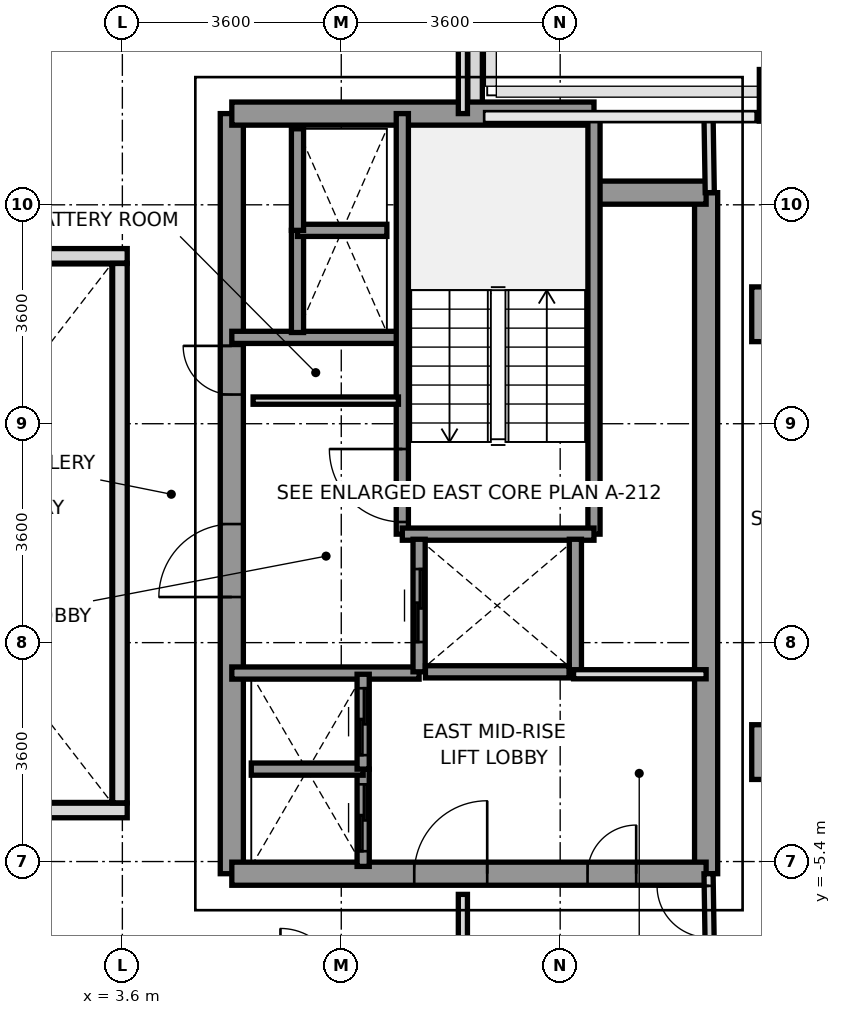
"""IFC4 building model, lengths in metres.
Left out: names, types, materials, properties, quantities, classifications, styles, units other than length and angle.
Written with IfcOpenShell. Run it as: python <this file> out.ifc"""

import sys

from ifc_helpers import new_model, si_unit, direction, frame, frame_2d, origin, origin_2d, place, context, subcontext, project, spatial, rectangle, extrude, source, transform, mapped, element, fill, save


model = new_model("IFC4")
c1 = context("Model", 3, precision=1e-05, world=origin(), true_north=direction((0.0, 1.0)))
c2 = subcontext(c1, "Body", "Model", "MODEL_VIEW")
j1 = project(units=[si_unit("LENGTHUNIT", "METRE"), si_unit("PLANEANGLEUNIT", "RADIAN")], contexts=[c1])
p1 = place(None, origin())
s1 = spatial("IfcSite", under=j1, at=p1, CompositionType="ELEMENT")
p2 = place(p1, origin())
s2 = spatial("IfcBuilding", under=s1, at=p2, CompositionType="ELEMENT")
p3 = place(p2, frame((0.0, 0.0, 174.0)))
s3 = spatial("IfcBuildingStorey", under=s2, at=p3, CompositionType="ELEMENT", Elevation=174.0)
m1 = source(origin(), c2, "Body", "SweptSolid", [
    extrude(rectangle(XDim=0.9, YDim=0.9, at=origin_2d()), origin(), (0.0, 0.0, 1.0), 3.2),
])
for number, where, z_axis, x_axis in (
    (1, (14.4, -3.6, 0.0), (0.0, 0.0, 1.0), (1.0, 0.0, 0.0)),
    (2, (14.4, 3.6, 0.0), (0.0, 0.0, 1.0), (1.0, 0.0, 0.0)),
):
    element("IfcColumn", number, at=place(p3, frame(where, z_axis=z_axis, x_axis=x_axis)), inside=s3, PredefinedType="COLUMN", context=c2, shape_type="MappedRepresentation", body=[
        mapped(m1, transform((0.0, 0.0, 0.0), x_axis=(1.0, 0.0, 0.0), y_axis=(0.0, 1.0, 0.0), z_axis=(0.0, 0.0, 1.0), scale=1.0)),
    ])
m2 = source(origin(), c2, "Body", "SweptSolid", [
    extrude(rectangle(XDim=0.65, YDim=0.85, at=origin_2d()), origin(), (0.0, 0.0, 1.0), 3.2),
])
p4 = place(p3, frame((14.4, 7.2, 0.0), z_axis=(0.0, 0.0, 1.0), x_axis=(1.0, 0.0, 0.0)))
e3 = element("IfcColumn", 3, at=p4, inside=s3, PredefinedType="COLUMN", context=c2, shape_type="MappedRepresentation", body=[
    mapped(m2, transform((0.0, 0.0, 0.0), x_axis=(1.0, 0.0, 0.0), y_axis=(0.0, 1.0, 0.0), z_axis=(0.0, 0.0, 1.0), scale=1.0)),
])
p5 = place(p3, frame((9.4, 8.547, 0.0), z_axis=(0.0, 0.0, 1.0), x_axis=(0.0, -1.0, 0.0)))
e4 = element("IfcWall", 4, at=p5, inside=s3, PredefinedType="PARAPET", context=c2, shape_type="SweptSolid", body=[
    extrude(rectangle(XDim=1.594, YDim=0.24, at=frame_2d((0.797, 0.0))), origin(), (0.0, 0.0, 1.0), 1.15),
])
p6 = place(p3, frame((13.2, -5.6, 0.0), z_axis=(0.0, 0.0, 1.0), x_axis=(0.0, 1.0, 0.0)))
e5 = element("IfcWall", 5, at=p6, inside=s3, PredefinedType="SHEAR", context=c2, shape_type="SweptSolid", body=[
    extrude(rectangle(XDim=11.2, YDim=0.38, at=frame_2d((5.6, 0.0))), origin(), (0.0, 0.0, 1.0), 3.2),
])
p7 = place(p3, frame((5.4, -5.6, 0.0), z_axis=(0.0, 0.0, 1.0), x_axis=(0.0, 1.0, 0.0)))
e6 = element("IfcWall", 6, at=p7, inside=s3, PredefinedType="SHEAR", context=c2, shape_type="SweptSolid", body=[
    extrude(rectangle(XDim=12.5, YDim=0.38, at=frame_2d((6.25, 0.0))), origin(), (0.0, 0.0, 1.0), 3.2),
])
p8 = place(p7, frame((4.55, 0.0, 0.0)))
e7 = element("IfcOpeningElement", 7, at=p8, cuts=e6, PredefinedType="OPENING", context=c2, shape_type="SweptSolid", body=[
    extrude(rectangle(XDim=1.2, YDim=2.2, at=frame_2d((0.6, 1.1))), frame((0.0, 0.2, 0.0), z_axis=(0.0, -1.0, 0.0), x_axis=(1.0, 0.0, 0.0)), (0.0, 0.0, 1.0), 0.4),
])
p9 = place(p7, frame((7.88, 0.0, 0.0)))
e8 = element("IfcOpeningElement", 8, at=p9, cuts=e6, PredefinedType="OPENING", context=c2, shape_type="SweptSolid", body=[
    extrude(rectangle(XDim=0.8, YDim=2.1, at=frame_2d((0.4, 1.05))), frame((0.0, 0.2, 0.0), z_axis=(0.0, -1.0, 0.0), x_axis=(1.0, 0.0, 0.0)), (0.0, 0.0, 1.0), 0.4),
])
p10 = place(p3, frame((5.4, 6.9, 0.0), z_axis=(0.0, 0.0, 1.0), x_axis=(1.0, 0.0, 0.0)))
e9 = element("IfcWall", 9, at=p10, inside=s3, PredefinedType="SHEAR", context=c2, shape_type="SweptSolid", body=[
    extrude(rectangle(XDim=5.956, YDim=0.38, at=frame_2d((2.978, 0.0))), origin(), (0.0, 0.0, 1.0), 3.2),
])
p11 = place(p3, frame((11.356, 5.6, 0.0), z_axis=(0.0, 0.0, 1.0), x_axis=(1.0, 0.0, 0.0)))
e10 = element("IfcWall", 10, at=p11, inside=s3, PredefinedType="SHEAR", context=c2, shape_type="SweptSolid", body=[
    extrude(rectangle(XDim=1.844, YDim=0.38, at=frame_2d((0.922, 0.0))), origin(), (0.0, 0.0, 1.0), 3.2),
])
p12 = place(p3, frame((5.4, -5.6, 0.0), z_axis=(0.0, 0.0, 1.0), x_axis=(1.0, 0.0, 0.0)))
e11 = element("IfcWall", 11, at=p12, inside=s3, PredefinedType="SHEAR", context=c2, shape_type="SweptSolid", body=[
    extrude(rectangle(XDim=7.8, YDim=0.38, at=frame_2d((3.9, 0.0))), origin(), (0.0, 0.0, 1.0), 3.2),
])
p13 = place(p12, frame((3.0, 0.0, 0.0)))
e12 = element("IfcOpeningElement", 12, at=p13, cuts=e11, PredefinedType="OPENING", context=c2, shape_type="SweptSolid", body=[
    extrude(rectangle(XDim=1.2, YDim=2.2, at=frame_2d((0.6, 1.1))), frame((0.0, 0.2, 0.0), z_axis=(0.0, -1.0, 0.0), x_axis=(1.0, 0.0, 0.0)), (0.0, 0.0, 1.0), 0.4),
])
p14 = place(p12, frame((5.85, 0.0, 0.0)))
e13 = element("IfcOpeningElement", 13, at=p14, cuts=e11, PredefinedType="OPENING", context=c2, shape_type="SweptSolid", body=[
    extrude(rectangle(XDim=0.8, YDim=2.1, at=frame_2d((0.4, 1.05))), frame((0.0, 0.2, 0.0), z_axis=(0.0, -1.0, 0.0), x_axis=(1.0, 0.0, 0.0)), (0.0, 0.0, 1.0), 0.4),
])
p15 = place(p3, frame((5.4, 3.22, 0.0), z_axis=(0.0, 0.0, 1.0), x_axis=(1.0, 0.0, 0.0)))
e14 = element("IfcWall", 14, at=p15, inside=s3, PredefinedType="SOLIDWALL", context=c2, shape_type="SweptSolid", body=[
    extrude(rectangle(XDim=2.78, YDim=0.2, at=frame_2d((1.39, 0.0))), origin(), (0.0, 0.0, 1.0), 3.2),
])
p16 = place(p3, frame((5.4, -2.3, 0.0), z_axis=(0.0, 0.0, 1.0), x_axis=(1.0, 0.0, 0.0)))
e15 = element("IfcWall", 15, at=p16, inside=s3, PredefinedType="SOLIDWALL", context=c2, shape_type="SweptSolid", body=[
    extrude(rectangle(XDim=3.08, YDim=0.2, at=frame_2d((1.54, 0.0))), origin(), (0.0, 0.0, 1.0), 3.2),
])
p17 = place(p3, frame((8.204, -0.016, 0.0), z_axis=(0.0, 0.0, 1.0), x_axis=(0.0, 1.0, 0.0)))
e16 = element("IfcWall", 16, at=p17, inside=s3, PredefinedType="SOLIDWALL", context=c2, shape_type="SweptSolid", body=[
    extrude(rectangle(XDim=6.916, YDim=0.2, at=frame_2d((3.458, 0.0))), origin(), (0.0, 0.0, 1.0), 3.2),
])
p18 = place(p17, frame((0.2, 0.0, 0.0)))
e17 = element("IfcOpeningElement", 17, at=p18, cuts=e16, PredefinedType="OPENING", context=c2, shape_type="SweptSolid", body=[
    extrude(rectangle(XDim=1.2, YDim=2.2, at=frame_2d((0.6, 1.1))), frame((0.0, 0.11, 0.0), z_axis=(0.0, -1.0, 0.0), x_axis=(1.0, 0.0, 0.0)), (0.0, 0.0, 1.0), 0.22),
])
p19 = place(p3, frame((11.356, -0.016, 0.0), z_axis=(0.0, 0.0, 1.0), x_axis=(0.0, 1.0, 0.0)))
e18 = element("IfcWall", 18, at=p19, inside=s3, PredefinedType="SOLIDWALL", context=c2, shape_type="SweptSolid", body=[
    extrude(rectangle(XDim=6.916, YDim=0.2, at=frame_2d((3.458, 0.0))), origin(), (0.0, 0.0, 1.0), 3.2),
])
p20 = place(p3, frame((8.204, -0.016, 0.0), z_axis=(0.0, 0.0, 1.0), x_axis=(1.0, 0.0, 0.0)))
e19 = element("IfcWall", 19, at=p20, inside=s3, PredefinedType="SOLIDWALL", context=c2, shape_type="SweptSolid", body=[
    extrude(rectangle(XDim=3.152, YDim=0.2, at=frame_2d((1.576, 0.0))), origin(), (0.0, 0.0, 1.0), 3.2),
])
p21 = place(p3, frame((8.48, -2.28, 0.0), z_axis=(0.0, 0.0, 1.0), x_axis=(0.0, 1.0, 0.0)))
e20 = element("IfcWall", 20, at=p21, inside=s3, PredefinedType="SOLIDWALL", context=c2, shape_type="SweptSolid", body=[
    extrude(rectangle(XDim=2.18, YDim=0.2, at=frame_2d((1.09, 0.0))), origin(), (0.0, 0.0, 1.0), 3.2),
])
p22 = place(p21, frame((0.49, 0.0, 0.0)))
e21 = element("IfcOpeningElement", 21, at=p22, cuts=e20, PredefinedType="OPENING", context=c2, shape_type="SweptSolid", body=[
    extrude(rectangle(XDim=1.2, YDim=2.2, at=frame_2d((0.6, 1.1))), frame((0.0, 0.11, 0.0), z_axis=(0.0, -1.0, 0.0), x_axis=(1.0, 0.0, 0.0)), (0.0, 0.0, 1.0), 0.22),
])
p23 = place(p3, frame((11.05, -2.28, 0.0), z_axis=(0.0, 0.0, 1.0), x_axis=(0.0, 1.0, 0.0)))
e22 = element("IfcWall", 22, at=p23, inside=s3, PredefinedType="SOLIDWALL", context=c2, shape_type="SweptSolid", body=[
    extrude(rectangle(XDim=2.18, YDim=0.2, at=frame_2d((1.09, 0.0))), origin(), (0.0, 0.0, 1.0), 3.2),
])
p24 = place(p3, frame((8.584, -2.28, 0.0), z_axis=(0.0, 0.0, 1.0), x_axis=(1.0, 0.0, 0.0)))
e23 = element("IfcWall", 23, at=p24, inside=s3, PredefinedType="SOLIDWALL", context=c2, shape_type="SweptSolid", body=[
    extrude(rectangle(XDim=2.362, YDim=0.2, at=frame_2d((1.181, 0.0))), origin(), (0.0, 0.0, 1.0), 3.2),
])
p25 = place(p3, frame((7.56, -5.48, 0.0), z_axis=(0.0, 0.0, 1.0), x_axis=(0.0, 1.0, 0.0)))
e24 = element("IfcWall", 24, at=p25, inside=s3, PredefinedType="SOLIDWALL", context=c2, shape_type="SweptSolid", body=[
    extrude(rectangle(XDim=1.6, YDim=0.2, at=frame_2d((0.8, 0.0))), origin(), (0.0, 0.0, 1.0), 3.2),
])
p26 = place(p25, frame((0.25, 0.0, 0.0)))
e25 = element("IfcOpeningElement", 25, at=p26, cuts=e24, PredefinedType="OPENING", context=c2, shape_type="SweptSolid", body=[
    extrude(rectangle(XDim=1.1, YDim=2.2, at=frame_2d((0.55, 1.1))), frame((0.0, 0.11, 0.0), z_axis=(0.0, -1.0, 0.0), x_axis=(1.0, 0.0, 0.0)), (0.0, 0.0, 1.0), 0.22),
])
p27 = place(p3, frame((5.72, -3.88, 0.0), z_axis=(0.0, 0.0, 1.0), x_axis=(1.0, 0.0, 0.0)))
e26 = element("IfcWall", 26, at=p27, inside=s3, PredefinedType="SOLIDWALL", context=c2, shape_type="SweptSolid", body=[
    extrude(rectangle(XDim=1.84, YDim=0.2, at=frame_2d((0.92, 0.0))), origin(), (0.0, 0.0, 1.0), 3.2),
])
p28 = place(p3, frame((7.56, -3.88, 0.0), z_axis=(0.0, 0.0, 1.0), x_axis=(0.0, 1.0, 0.0)))
e27 = element("IfcWall", 27, at=p28, inside=s3, PredefinedType="SOLIDWALL", context=c2, shape_type="SweptSolid", body=[
    extrude(rectangle(XDim=1.56, YDim=0.2, at=frame_2d((0.78, 0.0))), origin(), (0.0, 0.0, 1.0), 3.2),
])
p29 = place(p28, frame((0.23, 0.0, 0.0)))
e28 = element("IfcOpeningElement", 28, at=p29, cuts=e27, PredefinedType="OPENING", context=c2, shape_type="SweptSolid", body=[
    extrude(rectangle(XDim=1.1, YDim=2.2, at=frame_2d((0.55, 1.1))), frame((0.0, 0.11, 0.0), z_axis=(0.0, -1.0, 0.0), x_axis=(1.0, 0.0, 0.0)), (0.0, 0.0, 1.0), 0.22),
])
p30 = place(p3, frame((6.48, 3.3, 0.0), z_axis=(0.0, 0.0, 1.0), x_axis=(0.0, 1.0, 0.0)))
e29 = element("IfcWall", 29, at=p30, inside=s3, PredefinedType="SOLIDWALL", context=c2, shape_type="SweptSolid", body=[
    extrude(rectangle(XDim=1.68, YDim=0.2, at=frame_2d((0.84, 0.0))), origin(), (0.0, 0.0, 1.0), 3.2),
])
p31 = place(p3, frame((6.48, 4.98, 0.0), z_axis=(0.0, 0.0, 1.0), x_axis=(1.0, 0.0, 0.0)))
e30 = element("IfcWall", 30, at=p31, inside=s3, PredefinedType="SOLIDWALL", context=c2, shape_type="SweptSolid", body=[
    extrude(rectangle(XDim=1.47, YDim=0.2, at=frame_2d((0.735, 0.0))), origin(), (0.0, 0.0, 1.0), 3.2),
])
p32 = place(p3, frame((6.48, 4.98, 0.0), z_axis=(0.0, 0.0, 1.0), x_axis=(0.0, 1.0, 0.0)))
e31 = element("IfcWall", 31, at=p32, inside=s3, PredefinedType="SOLIDWALL", context=c2, shape_type="SweptSolid", body=[
    extrude(rectangle(XDim=1.67, YDim=0.2, at=frame_2d((0.835, 0.0))), origin(), (0.0, 0.0, 1.0), 3.2),
])
p33 = place(p3, frame((5.75, 2.18, 0.0), z_axis=(0.0, 0.0, 1.0), x_axis=(1.0, 0.0, 0.0)))
e32 = element("IfcWall", 32, at=p33, inside=s3, PredefinedType="PARTITIONING", context=c2, shape_type="SweptSolid", body=[
    extrude(rectangle(XDim=2.39, YDim=0.12, at=frame_2d((1.195, 0.0))), origin(), (0.0, 0.0, 1.0), 2.3),
])
p34 = place(p3, frame((11.02, -2.32, 0.0), z_axis=(0.0, 0.0, 1.0), x_axis=(1.0, 0.0, 0.0)))
e33 = element("IfcWall", 33, at=p34, inside=s3, PredefinedType="PARTITIONING", context=c2, shape_type="SweptSolid", body=[
    extrude(rectangle(XDim=2.18, YDim=0.15, at=frame_2d((1.09, 0.0))), origin(), (0.0, 0.0, 1.0), 3.2),
])
p35 = place(p3, frame((9.2, 6.9, 0.0), z_axis=(0.0, 0.0, 1.0), x_axis=(0.0, 1.0, 0.0)))
e34 = element("IfcWall", 34, at=p35, inside=s3, PredefinedType="PARTITIONING", context=c2, shape_type="SweptSolid", body=[
    extrude(rectangle(XDim=8.78, YDim=0.15, at=frame_2d((4.39, 0.0))), origin(), (0.0, 0.0, 1.0), 2.75),
])
p36 = place(p3, frame((9.2, -15.68, 0.0), z_axis=(0.0, 0.0, 1.0), x_axis=(0.0, 1.0, 0.0)))
e35 = element("IfcWall", 35, at=p36, inside=s3, PredefinedType="PARTITIONING", context=c2, shape_type="SweptSolid", body=[
    extrude(rectangle(XDim=9.74, YDim=0.15, at=frame_2d((4.87, 0.0))), origin(), (0.0, 0.0, 1.0), 2.75),
])
p37 = place(p3, frame((13.26, 5.6, 0.0), z_axis=(0.0, 0.0, 1.0), x_axis=(-0.016013571389, 0.999871774545, 0.0)))
e36 = element("IfcWall", 36, at=p37, inside=s3, PredefinedType="PARTITIONING", context=c2, shape_type="SweptSolid", body=[
    extrude(rectangle(XDim=1.25, YDim=0.15, at=frame_2d((0.625, 0.0))), origin(), (0.0, 0.0, 1.0), 3.2),
])
p38 = place(p3, frame((13.26, -6.85, 0.0), z_axis=(0.0, 0.0, 1.0), x_axis=(-0.016013571389, 0.999871774545, 0.0)))
e37 = element("IfcWall", 37, at=p38, inside=s3, PredefinedType="PARTITIONING", context=c2, shape_type="SweptSolid", body=[
    extrude(rectangle(XDim=1.25, YDim=0.15, at=frame_2d((0.625, 0.0))), origin(), (0.0, 0.0, 1.0), 3.2),
])
p39 = place(p38, frame((0.2, 0.0, 0.0)))
e38 = element("IfcOpeningElement", 38, at=p39, cuts=e37, PredefinedType="OPENING", context=c2, shape_type="SweptSolid", body=[
    extrude(rectangle(XDim=0.85, YDim=2.1, at=frame_2d((0.425, 1.05))), frame((0.0, 0.085, 0.0), z_axis=(0.0, -1.0, 0.0), x_axis=(1.0, 0.0, 0.0)), (0.0, 0.0, 1.0), 0.17),
])
for number, where, z_axis, x_axis in (
    (39, (-3.68, -4.56, 0.0), (0.0, 0.0, 1.0), (1.0, 0.0, 0.0)),
    (40, (-3.68, 4.56, 0.0), (0.0, 0.0, 1.0), (1.0, 0.0, 0.0)),
):
    element("IfcWall", number, at=place(p3, frame(where, z_axis=z_axis, x_axis=x_axis)), inside=s3, PredefinedType="PARAPET", context=c2, shape_type="SweptSolid", body=[
        extrude(rectangle(XDim=7.36, YDim=0.24, at=frame_2d((3.68, 0.0))), origin(), (0.0, 0.0, 1.0), 1.15),
    ])
p40 = place(p3, frame((3.56, -4.435, 0.0), z_axis=(0.0, 0.0, 1.0), x_axis=(0.0, 1.0, 0.0)))
e41 = element("IfcWall", 41, at=p40, inside=s3, PredefinedType="PARAPET", context=c2, shape_type="SweptSolid", body=[
    extrude(rectangle(XDim=8.87, YDim=0.24, at=frame_2d((4.435, 0.0))), origin(), (0.0, 0.0, 1.0), 1.15),
])
m3 = source(origin(), c2, "Body", "SweptSolid", [
    extrude(rectangle(XDim=1.2, YDim=2.2, at=frame_2d((0.6, 1.1))), frame((0.0, 0.025, 0.0), z_axis=(0.0, -1.0, 0.0), x_axis=(1.0, 0.0, 0.0)), (0.0, 0.0, 1.0), 0.05),
])
p41 = place(p18, origin())
e42 = element("IfcDoor", 42, at=p41, inside=s3, OperationType="SINGLE_SWING_RIGHT", PredefinedType="DOOR", context=c2, shape_type="MappedRepresentation", body=[
    mapped(m3, transform((0.0, 0.0, 0.0), x_axis=(1.0, 0.0, 0.0), y_axis=(0.0, 1.0, 0.0), z_axis=(0.0, 0.0, 1.0), scale=1.0)),
])
fill(e17, e42)
p42 = place(p8, origin())
e43 = element("IfcDoor", 43, at=p42, inside=s3, OperationType="SINGLE_SWING_LEFT", PredefinedType="DOOR", context=c2, shape_type="MappedRepresentation", body=[
    mapped(m3, transform((0.0, 0.0, 0.0), x_axis=(1.0, 0.0, 0.0), y_axis=(0.0, 1.0, 0.0), z_axis=(0.0, 0.0, 1.0), scale=1.0)),
])
fill(e7, e43)
p43 = place(p13, origin())
e44 = element("IfcDoor", 44, at=p43, inside=s3, OperationType="SINGLE_SWING_RIGHT", PredefinedType="DOOR", context=c2, shape_type="MappedRepresentation", body=[
    mapped(m3, transform((0.0, 0.0, 0.0), x_axis=(1.0, 0.0, 0.0), y_axis=(0.0, 1.0, 0.0), z_axis=(0.0, 0.0, 1.0), scale=1.0)),
])
fill(e12, e44)
m4 = source(origin(), c2, "Body", "SweptSolid", [
    extrude(rectangle(XDim=0.8, YDim=2.1, at=frame_2d((0.4, 1.05))), frame((0.0, 0.025, 0.0), z_axis=(0.0, -1.0, 0.0), x_axis=(1.0, 0.0, 0.0)), (0.0, 0.0, 1.0), 0.05),
])
p44 = place(p9, origin())
e45 = element("IfcDoor", 45, at=p44, inside=s3, OperationType="SINGLE_SWING_RIGHT", PredefinedType="DOOR", context=c2, shape_type="MappedRepresentation", body=[
    mapped(m4, transform((0.0, 0.0, 0.0), x_axis=(1.0, 0.0, 0.0), y_axis=(0.0, 1.0, 0.0), z_axis=(0.0, 0.0, 1.0), scale=1.0)),
])
fill(e8, e45)
p45 = place(p14, origin())
e46 = element("IfcDoor", 46, at=p45, inside=s3, OperationType="SINGLE_SWING_RIGHT", PredefinedType="DOOR", context=c2, shape_type="MappedRepresentation", body=[
    mapped(m4, transform((0.0, 0.0, 0.0), x_axis=(1.0, 0.0, 0.0), y_axis=(0.0, 1.0, 0.0), z_axis=(0.0, 0.0, 1.0), scale=1.0)),
])
fill(e13, e46)
p46 = place(p22, origin())
e47 = element("IfcDoor", 47, at=p46, inside=s3, OperationType="SLIDING_TO_RIGHT", PredefinedType="DOOR", context=c2, shape_type="MappedRepresentation", body=[
    mapped(m3, transform((0.0, 0.0, 0.0), x_axis=(1.0, 0.0, 0.0), y_axis=(0.0, 1.0, 0.0), z_axis=(0.0, 0.0, 1.0), scale=1.0)),
])
fill(e21, e47)
m5 = source(origin(), c2, "Body", "SweptSolid", [
    extrude(rectangle(XDim=1.1, YDim=2.2, at=frame_2d((0.55, 1.1))), frame((0.0, 0.025, 0.0), z_axis=(0.0, -1.0, 0.0), x_axis=(1.0, 0.0, 0.0)), (0.0, 0.0, 1.0), 0.05),
])
p47 = place(p26, origin())
e48 = element("IfcDoor", 48, at=p47, inside=s3, OperationType="SLIDING_TO_LEFT", PredefinedType="DOOR", context=c2, shape_type="MappedRepresentation", body=[
    mapped(m5, transform((0.0, 0.0, 0.0), x_axis=(1.0, 0.0, 0.0), y_axis=(0.0, 1.0, 0.0), z_axis=(0.0, 0.0, 1.0), scale=1.0)),
])
fill(e25, e48)
p48 = place(p29, origin())
e49 = element("IfcDoor", 49, at=p48, inside=s3, OperationType="SLIDING_TO_LEFT", PredefinedType="DOOR", context=c2, shape_type="MappedRepresentation", body=[
    mapped(m5, transform((0.0, 0.0, 0.0), x_axis=(1.0, 0.0, 0.0), y_axis=(0.0, 1.0, 0.0), z_axis=(0.0, 0.0, 1.0), scale=1.0)),
])
fill(e28, e49)
m6 = source(origin(), c2, "Body", "SweptSolid", [
    extrude(rectangle(XDim=0.85, YDim=2.1, at=frame_2d((0.425, 1.05))), frame((0.0, 0.025, 0.0), z_axis=(0.0, -1.0, 0.0), x_axis=(1.0, 0.0, 0.0)), (0.0, 0.0, 1.0), 0.05),
])
p49 = place(p39, origin())
e50 = element("IfcDoor", 50, at=p49, inside=s3, OperationType="SINGLE_SWING_RIGHT", PredefinedType="DOOR", context=c2, shape_type="MappedRepresentation", body=[
    mapped(m6, transform((0.0, 0.0, 0.0), x_axis=(1.0, 0.0, 0.0), y_axis=(0.0, 1.0, 0.0), z_axis=(0.0, 0.0, 1.0), scale=1.0)),
])
fill(e38, e50)
save(model, sys.argv[1])
